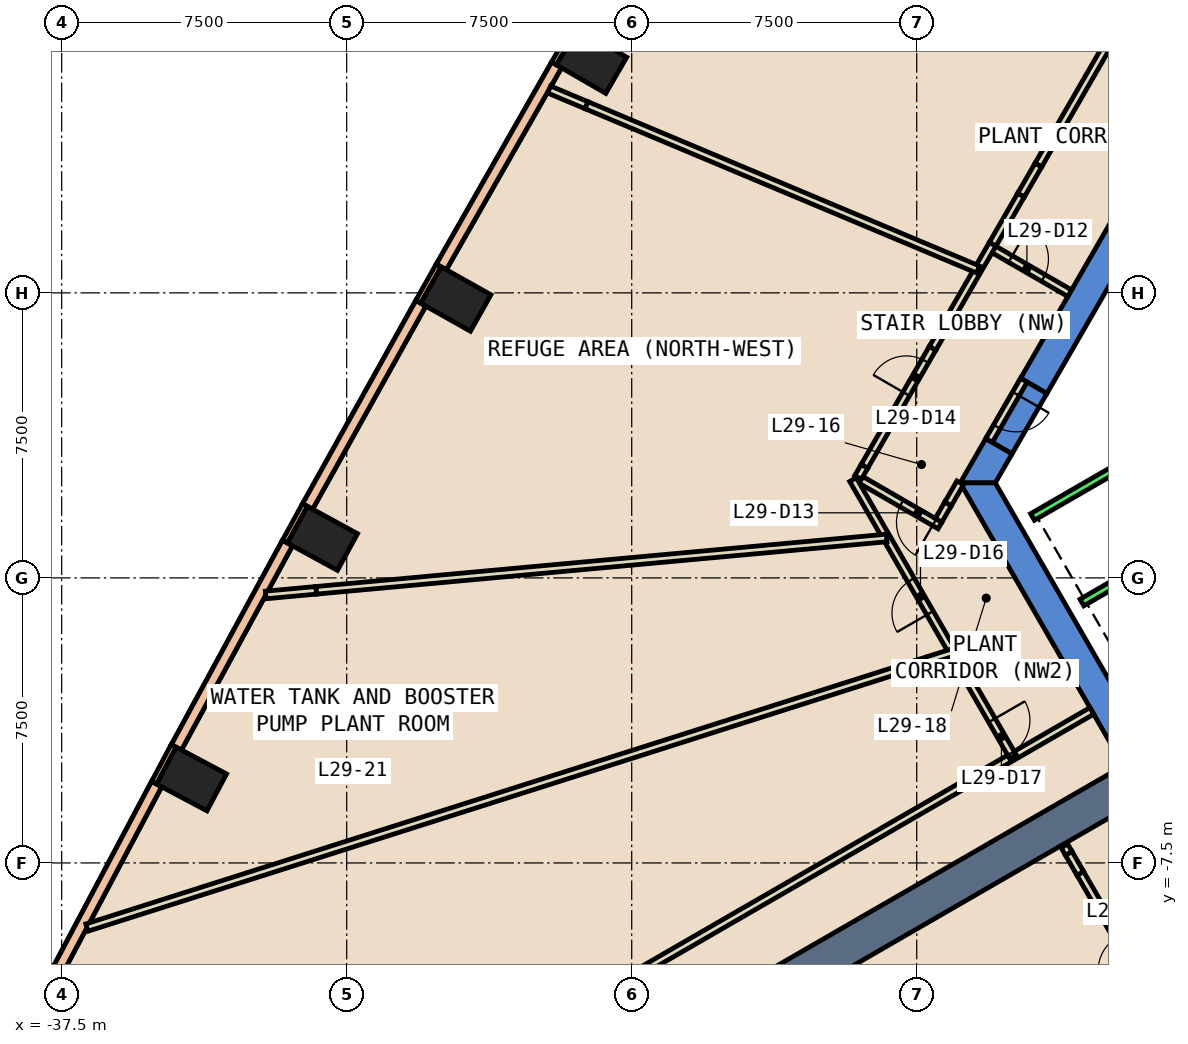
"""IFC4 building model, lengths in metres.
Left out: names, types, materials, properties, quantities, classifications, styles, units other than length and angle.
Written with IfcOpenShell. Run it as: python <this file> out.ifc"""

import sys

from ifc_helpers import new_model, si_unit, direction, frame, frame_2d, origin, origin_2d, place, context, subcontext, project, spatial, polyline, rectangle, outline, extrude, element, fill, save


model = new_model("IFC4")
c1 = context("Model", 3, precision=1e-05, world=origin(), true_north=direction((0.0, 1.0)))
c2 = subcontext(c1, "Body", "Model", "MODEL_VIEW")
j1 = project(units=[si_unit("LENGTHUNIT", "METRE"), si_unit("PLANEANGLEUNIT", "RADIAN")], contexts=[c1])
p1 = place(None, origin())
s1 = spatial("IfcSite", under=j1, at=p1, CompositionType="ELEMENT")
p2 = place(p1, origin())
s2 = spatial("IfcBuilding", under=s1, at=p2, CompositionType="ELEMENT")
p3 = place(p2, frame((0.0, 0.0, 132.8)))
s3 = spatial("IfcBuildingStorey", under=s2, at=p3, CompositionType="ELEMENT", Elevation=132.8)
for number, where, z_axis, x_axis in (
    (1, (-23.556, 13.6, -0.6), (0.0, 0.0, 1.0), (0.5, 0.866, 0.0)),
    (2, (-27.128, 7.338, -0.6), (0.0, 0.0, 1.0), (0.49, 0.872, 0.0)),
    (3, (-30.637, 1.04, -0.6), (0.0, 0.0, 1.0), (0.48, 0.877, 0.0)),
    (4, (-34.081, -5.292, -0.6), (0.0, 0.0, 1.0), (0.469, 0.883, 0.0)),
):
    element("IfcColumn", number, at=place(p3, frame(where, z_axis=z_axis, x_axis=x_axis)), inside=s3, PredefinedType="COLUMN", context=c2, shape_type="SweptSolid", body=[
        extrude(rectangle(XDim=1.1, YDim=1.5, at=origin_2d()), origin(), (0.0, 0.0, 1.0), 5.4),
    ])
p4 = place(p3, frame((0.0, 0.0, -0.6)))
e5 = element("IfcWall", 5, at=p4, inside=s3, PredefinedType="SHEAR", context=c2, shape_type="SweptSolid", body=[
    extrude(outline(polyline([(-12.267, 5.252), (-11.575, 4.852), (-6.466, 13.7), (-6.928, 14.5), (-12.267, 5.252)])), origin(), (0.0, 0.0, 1.0), 5.4),
])
p5 = place(p3, frame((0.0, 0.0, -0.6)))
e6 = element("IfcWall", 6, at=p5, inside=s3, PredefinedType="SHEAR", context=c2, shape_type="SweptSolid", body=[
    extrude(outline(polyline([(-12.49, 3.268), (-13.182, 3.667), (-13.856, 2.5), (-12.933, 2.5), (-12.49, 3.268)])), origin(), (0.0, 0.0, 1.0), 5.4),
])
p6 = place(p3, frame((0.0, 0.0, 3.6)))
e7 = element("IfcWall", 7, at=p6, inside=s3, PredefinedType="SHEAR", context=c2, shape_type="SweptSolid", body=[
    extrude(outline(polyline([(-13.182, 3.667), (-12.49, 3.268), (-11.575, 4.852), (-12.267, 5.252), (-13.182, 3.667)])), origin(), (0.0, 0.0, 1.0), 1.2),
])
p7 = place(p3, frame((0.0, 0.0, -0.6)))
e8 = element("IfcWall", 8, at=p7, inside=s3, PredefinedType="SHEAR", context=c2, shape_type="SweptSolid", body=[
    extrude(outline(polyline([(-13.856, 2.5), (-6.928, -9.5), (-6.466, -8.7), (-12.933, 2.5), (-13.856, 2.5)])), origin(), (0.0, 0.0, 1.0), 5.4),
])
p8 = place(p3, frame((-9.31, -5.375, 0.0), z_axis=(0.0, 0.0, 1.0), x_axis=(-0.86602173752, -0.500006350103, 0.0)))
e9 = element("IfcWall", 9, at=p8, inside=s3, PredefinedType="SHEAR", context=c2, shape_type="SweptSolid", body=[
    extrude(rectangle(XDim=31.463, YDim=1.0, at=frame_2d((15.732, 0.0))), origin(), (0.0, 0.0, 1.0), 4.8),
])
p9 = place(p3, frame((-23.995, 14.489, 0.0), z_axis=(0.0, 0.0, 1.0), x_axis=(-0.499671230855, -0.86621513555, 0.0)))
e10 = element("IfcWall", 10, at=p9, inside=s3, PredefinedType="STANDARD", context=c2, shape_type="SweptSolid", body=[
    extrude(rectangle(XDim=1.1, YDim=0.15, at=frame_2d((0.55, 0.0))), origin(), (0.0, 0.0, 1.0), 4.8),
])
p10 = place(p3, frame((-27.578, 8.222, 0.0), z_axis=(0.0, 0.0, 1.0), x_axis=(-0.490008344094, -0.871717742574, 0.0)))
e11 = element("IfcWall", 11, at=p10, inside=s3, PredefinedType="STANDARD", context=c2, shape_type="SweptSolid", body=[
    extrude(rectangle(XDim=1.1, YDim=0.15, at=frame_2d((0.55, 0.0))), origin(), (0.0, 0.0, 1.0), 4.8),
])
p11 = place(p3, frame((-31.097, 1.919, 0.0), z_axis=(0.0, 0.0, 1.0), x_axis=(-0.479644301902, -0.877463015547, 0.0)))
e12 = element("IfcWall", 12, at=p11, inside=s3, PredefinedType="STANDARD", context=c2, shape_type="SweptSolid", body=[
    extrude(rectangle(XDim=1.101, YDim=0.15, at=frame_2d((0.551, 0.0))), origin(), (0.0, 0.0, 1.0), 4.8),
])
p12 = place(p3, frame((-34.552, -4.42, 0.0), z_axis=(0.0, 0.0, 1.0), x_axis=(-0.469274244365, -0.883052480646, 0.0)))
e13 = element("IfcWall", 13, at=p12, inside=s3, PredefinedType="STANDARD", context=c2, shape_type="SweptSolid", body=[
    extrude(rectangle(XDim=1.1, YDim=0.15, at=frame_2d((0.55, 0.0))), origin(), (0.0, 0.0, 1.0), 4.8),
])
p13 = place(p3, frame((-24.477, 13.498, 0.0), z_axis=(0.0, 0.0, 1.0), x_axis=(-0.495541712582, -0.86858414163, 0.0)))
e14 = element("IfcWall", 14, at=p13, inside=s3, PredefinedType="STANDARD", context=c2, shape_type="SweptSolid", body=[
    extrude(rectangle(XDim=6.121, YDim=0.3, at=frame_2d((3.06, 0.0))), origin(), (0.0, 0.0, 1.0), 1.2),
])
p14 = place(p3, frame((-24.477, 13.498, 4.0), z_axis=(0.0, 0.0, 1.0), x_axis=(-0.495541712582, -0.86858414163, 0.0)))
e15 = element("IfcWall", 15, at=p14, inside=s3, PredefinedType="STANDARD", context=c2, shape_type="SweptSolid", body=[
    extrude(rectangle(XDim=6.121, YDim=0.3, at=frame_2d((3.06, 0.0))), origin(), (0.0, 0.0, 1.0), 0.8),
])
p15 = place(p3, frame((-28.049, 7.226, 0.0), z_axis=(0.0, 0.0, 1.0), x_axis=(-0.486753473685, -0.873539384261, 0.0)))
e16 = element("IfcWall", 16, at=p15, inside=s3, PredefinedType="STANDARD", context=c2, shape_type="SweptSolid", body=[
    extrude(rectangle(XDim=6.12, YDim=0.3, at=frame_2d((3.06, 0.0))), origin(), (0.0, 0.0, 1.0), 1.2),
])
p16 = place(p3, frame((-28.049, 7.226, 4.0), z_axis=(0.0, 0.0, 1.0), x_axis=(-0.486753473685, -0.873539384261, 0.0)))
e17 = element("IfcWall", 17, at=p16, inside=s3, PredefinedType="STANDARD", context=c2, shape_type="SweptSolid", body=[
    extrude(rectangle(XDim=6.12, YDim=0.3, at=frame_2d((3.06, 0.0))), origin(), (0.0, 0.0, 1.0), 0.8),
])
p17 = place(p3, frame((-31.558, 0.918, 0.0), z_axis=(0.0, 0.0, 1.0), x_axis=(-0.477655263247, -0.878547351879, 0.0)))
e18 = element("IfcWall", 18, at=p17, inside=s3, PredefinedType="STANDARD", context=c2, shape_type="SweptSolid", body=[
    extrude(rectangle(XDim=6.119, YDim=0.3, at=frame_2d((3.06, 0.0))), origin(), (0.0, 0.0, 1.0), 1.2),
])
p18 = place(p3, frame((-31.558, 0.918, 4.0), z_axis=(0.0, 0.0, 1.0), x_axis=(-0.477655263247, -0.878547351879, 0.0)))
e19 = element("IfcWall", 19, at=p18, inside=s3, PredefinedType="STANDARD", context=c2, shape_type="SweptSolid", body=[
    extrude(rectangle(XDim=6.119, YDim=0.3, at=frame_2d((3.06, 0.0))), origin(), (0.0, 0.0, 1.0), 0.8),
])
p19 = place(p3, frame((-35.001, -5.425, 0.0), z_axis=(0.0, 0.0, 1.0), x_axis=(-0.468639020107, -0.88338976043, 0.0)))
e20 = element("IfcWall", 20, at=p19, inside=s3, PredefinedType="STANDARD", context=c2, shape_type="SweptSolid", body=[
    extrude(rectangle(XDim=6.329, YDim=0.3, at=frame_2d((3.165, 0.0))), origin(), (0.0, 0.0, 1.0), 1.2),
])
p20 = place(p3, frame((-35.001, -5.425, 4.0), z_axis=(0.0, 0.0, 1.0), x_axis=(-0.468639020107, -0.88338976043, 0.0)))
e21 = element("IfcWall", 21, at=p20, inside=s3, PredefinedType="STANDARD", context=c2, shape_type="SweptSolid", body=[
    extrude(rectangle(XDim=6.329, YDim=0.3, at=frame_2d((3.165, 0.0))), origin(), (0.0, 0.0, 1.0), 0.8),
])
p21 = place(p3, frame((-39.358, -20.223, 0.0), z_axis=(0.0, 0.0, 1.0), x_axis=(0.866032184561, 0.499988255166, 0.0)))
e22 = element("IfcWall", 22, at=p21, inside=s3, PredefinedType="PARTITIONING", context=c2, shape_type="SweptSolid", body=[
    extrude(rectangle(XDim=33.447, YDim=0.2, at=frame_2d((16.723, 0.0))), origin(), (0.0, 0.0, 1.0), 4.8),
])
p22 = place(p3, frame((-13.053, 8.691, 0.0), z_axis=(0.0, 0.0, 1.0), x_axis=(0.865973769406, -0.500089422704, 0.0)))
e23 = element("IfcWall", 23, at=p22, inside=s3, PredefinedType="PARTITIONING", context=c2, shape_type="SweptSolid", body=[
    extrude(rectangle(XDim=2.399, YDim=0.2, at=frame_2d((1.2, 0.0))), origin(), (0.0, 0.0, 1.0), 4.8),
])
p23 = place(p22, frame((0.6, 0.0, 0.0)))
e24 = element("IfcOpeningElement", 24, at=p23, cuts=e23, PredefinedType="OPENING", context=c2, shape_type="SweptSolid", body=[
    extrude(rectangle(XDim=1.0, YDim=2.1, at=frame_2d((0.5, 1.05))), frame((0.0, 0.11, 0.0), z_axis=(0.0, -1.0, 0.0), x_axis=(1.0, 0.0, 0.0)), (0.0, 0.0, 1.0), 0.22),
])
p24 = place(p3, frame((-13.856, 2.501, 0.0), z_axis=(0.0, 0.0, 1.0), x_axis=(-0.500766044352, -0.865582675903, 0.0)))
e25 = element("IfcWall", 25, at=p24, inside=s3, PredefinedType="PARTITIONING", context=c2, shape_type="SweptSolid", body=[
    extrude(rectangle(XDim=0.641, YDim=0.2, at=frame_2d((0.321, 0.0))), origin(), (0.0, 0.0, 1.0), 2.4),
])
p25 = place(p3, frame((-14.388, 1.379, 0.0), z_axis=(0.0, 0.0, 1.0), x_axis=(-0.866022959057, 0.500004234368, 0.0)))
e26 = element("IfcWall", 26, at=p25, inside=s3, PredefinedType="PARTITIONING", context=c2, shape_type="SweptSolid", body=[
    extrude(rectangle(XDim=2.5, YDim=0.2, at=frame_2d((1.25, 0.0))), origin(), (0.0, 0.0, 1.0), 4.8),
])
p26 = place(p25, frame((0.168, 0.0, 0.0)))
e27 = element("IfcOpeningElement", 27, at=p26, cuts=e26, PredefinedType="OPENING", context=c2, shape_type="SweptSolid", body=[
    extrude(rectangle(XDim=1.0, YDim=2.1, at=frame_2d((0.5, 1.05))), frame((0.0, 0.11, 0.0), z_axis=(0.0, -1.0, 0.0), x_axis=(1.0, 0.0, 0.0)), (0.0, 0.0, 1.0), 0.22),
])
p27 = place(p3, frame((-16.543, 2.646, 0.0), z_axis=(0.0, 0.0, 1.0), x_axis=(0.500808028896, 0.865558385202, 0.0)))
e28 = element("IfcWall", 28, at=p27, inside=s3, PredefinedType="PARTITIONING", context=c2, shape_type="SweptSolid", body=[
    extrude(rectangle(XDim=0.337, YDim=0.2, at=frame_2d((0.169, 0.0))), origin(), (0.0, 0.0, 1.0), 2.4),
])
p28 = place(p3, frame((-13.003, 8.778, 0.0), z_axis=(0.0, 0.0, 1.0), x_axis=(0.499929606556, 0.866066041644, 0.0)))
e29 = element("IfcWall", 29, at=p28, inside=s3, PredefinedType="PARTITIONING", context=c2, shape_type="SweptSolid", body=[
    extrude(rectangle(XDim=1.496, YDim=0.2, at=frame_2d((0.748, 0.0))), origin(), (0.0, 0.0, 1.0), 4.8),
])
p29 = place(p3, frame((-14.001, -2.05, 0.0), z_axis=(0.0, 0.0, 1.0), x_axis=(-0.499842197933, 0.866116491683, 0.0)))
e30 = element("IfcWall", 30, at=p29, inside=s3, PredefinedType="PARTITIONING", context=c2, shape_type="SweptSolid", body=[
    extrude(rectangle(XDim=5.354, YDim=0.2, at=frame_2d((2.677, 0.0))), origin(), (0.0, 0.0, 1.0), 4.8),
])
p30 = place(p29, frame((1.301, 0.0, 0.0)))
e31 = element("IfcOpeningElement", 31, at=p30, cuts=e30, PredefinedType="OPENING", context=c2, shape_type="SweptSolid", body=[
    extrude(rectangle(XDim=1.0, YDim=2.1, at=frame_2d((0.5, 1.05))), frame((0.0, 0.11, 0.0), z_axis=(0.0, -1.0, 0.0), x_axis=(1.0, 0.0, 0.0)), (0.0, 0.0, 1.0), 0.22),
])
p31 = place(p3, frame((-14.001, -2.05, 0.0), z_axis=(0.0, 0.0, 1.0), x_axis=(0.500026340207, -0.866010195725, 0.0)))
e32 = element("IfcWall", 32, at=p31, inside=s3, PredefinedType="PARTITIONING", context=c2, shape_type="SweptSolid", body=[
    extrude(rectangle(XDim=3.06, YDim=0.2, at=frame_2d((1.53, 0.0))), origin(), (0.0, 0.0, 1.0), 4.8),
])
p32 = place(p31, frame((1.96, 0.0, 0.0)))
e33 = element("IfcOpeningElement", 33, at=p32, cuts=e32, PredefinedType="OPENING", context=c2, shape_type="SweptSolid", body=[
    extrude(rectangle(XDim=1.0, YDim=2.1, at=frame_2d((0.5, 1.05))), frame((0.0, 0.11, 0.0), z_axis=(0.0, -1.0, 0.0), x_axis=(1.0, 0.0, 0.0)), (0.0, 0.0, 1.0), 0.22),
])
p33 = place(p3, frame((-24.673, 12.85, 0.0), z_axis=(0.0, 0.0, 1.0), x_axis=(0.922202269671, -0.386707866241, 0.0)))
e34 = element("IfcWall", 34, at=p33, inside=s3, PredefinedType="PARTITIONING", context=c2, shape_type="SweptSolid", body=[
    extrude(rectangle(XDim=1.068, YDim=0.2, at=frame_2d((0.534, 0.0))), origin(), (0.0, 0.0, 1.0), 2.4),
])
p34 = place(p3, frame((-15.791, 1.051, 0.0), z_axis=(0.0, 0.0, 1.0), x_axis=(-0.995814925951, -0.091392741793, 0.0)))
e35 = element("IfcWall", 35, at=p34, inside=s3, PredefinedType="PARTITIONING", context=c2, shape_type="SweptSolid", body=[
    extrude(rectangle(XDim=15.077, YDim=0.2, at=frame_2d((7.539, 0.0))), origin(), (0.0, 0.0, 1.0), 4.8),
])
p35 = place(p3, frame((-14.051, -1.963, 0.0), z_axis=(0.0, 0.0, 1.0), x_axis=(-0.953071469252, -0.302745395504, 0.0)))
e36 = element("IfcWall", 36, at=p35, inside=s3, PredefinedType="PARTITIONING", context=c2, shape_type="SweptSolid", body=[
    extrude(rectangle(XDim=23.905, YDim=0.2, at=frame_2d((11.952, 0.0))), origin(), (0.0, 0.0, 1.0), 4.8),
])
p36 = place(p3, frame((-12.181, 5.202, 0.0), z_axis=(0.0, 0.0, 1.0), x_axis=(-0.500215337403, -0.865901042976, 0.0)))
e37 = element("IfcWall", 37, at=p36, inside=s3, PredefinedType="PARTITIONING", context=c2, shape_type="SweptSolid", body=[
    extrude(rectangle(XDim=1.829, YDim=0.2, at=frame_2d((0.915, 0.0))), origin(), (0.0, 0.0, 1.0), 2.4),
])
p37 = place(p36, frame((0.415, 0.0, 0.0)))
e38 = element("IfcOpeningElement", 38, at=p37, cuts=e37, PredefinedType="OPENING", context=c2, shape_type="SweptSolid", body=[
    extrude(rectangle(XDim=1.0, YDim=2.1, at=frame_2d((0.5, 1.05))), frame((0.0, 0.11, 0.0), z_axis=(0.0, -1.0, 0.0), x_axis=(1.0, 0.0, 0.0)), (0.0, 0.0, 1.0), 0.22),
])
p38 = place(p3, frame((-9.002, -10.709, 0.0), z_axis=(0.0, 0.0, 1.0), x_axis=(-0.499654870059, 0.866224572975, 0.0)))
e39 = element("IfcWall", 39, at=p38, inside=s3, PredefinedType="PARTITIONING", context=c2, shape_type="SweptSolid", body=[
    extrude(rectangle(XDim=2.398, YDim=0.2, at=frame_2d((1.199, 0.0))), origin(), (0.0, 0.0, 1.0), 4.8),
])
p39 = place(p38, frame((0.444, 0.0, 0.0)))
e40 = element("IfcOpeningElement", 40, at=p39, cuts=e39, PredefinedType="OPENING", context=c2, shape_type="SweptSolid", body=[
    extrude(rectangle(XDim=1.0, YDim=2.1, at=frame_2d((0.5, 1.05))), frame((0.0, 0.11, 0.0), z_axis=(0.0, -1.0, 0.0), x_axis=(1.0, 0.0, 0.0)), (0.0, 0.0, 1.0), 0.22),
])
p40 = place(p3, frame((-10.2, -8.632, 0.0), z_axis=(0.0, 0.0, 1.0), x_axis=(-0.500482758314, 0.865746503678, 0.0)))
e41 = element("IfcWall", 41, at=p40, inside=s3, PredefinedType="PARTITIONING", context=c2, shape_type="SweptSolid", body=[
    extrude(rectangle(XDim=0.991, YDim=0.2, at=frame_2d((0.496, 0.0))), origin(), (0.0, 0.0, 1.0), 2.3),
])
p41 = place(p3, frame((-10.696, -7.774, 0.0), z_axis=(0.0, 0.0, 1.0), x_axis=(-0.49972245349, 0.866185586049, 0.0)))
e42 = element("IfcWall", 42, at=p41, inside=s3, PredefinedType="PARTITIONING", context=c2, shape_type="SweptSolid", body=[
    extrude(rectangle(XDim=0.608, YDim=0.2, at=frame_2d((0.304, 0.0))), origin(), (0.0, 0.0, 1.0), 4.8),
])
p42 = place(p3, frame((-11.0, -7.247, 0.0), z_axis=(0.0, 0.0, 1.0), x_axis=(-0.499504513693, 0.866311284008, 0.0)))
e43 = element("IfcWall", 43, at=p42, inside=s3, PredefinedType="PARTITIONING", context=c2, shape_type="SweptSolid", body=[
    extrude(rectangle(XDim=0.226, YDim=0.2, at=frame_2d((0.113, 0.0))), origin(), (0.0, 0.0, 1.0), 2.1),
])
p43 = place(p3, frame((-14.177, 1.946, 0.0), z_axis=(0.0, 0.0, 1.0), x_axis=(-0.499736647136, -0.866177397251, 0.0)))
e44 = element("IfcWall", 44, at=p43, inside=s3, PredefinedType="PARTITIONING", context=c2, shape_type="SweptSolid", body=[
    extrude(rectangle(XDim=0.496, YDim=0.2, at=frame_2d((0.248, 0.0))), origin(), (0.0, 0.0, 1.0), 4.8),
])
p44 = place(p3, frame((-16.374, 2.938, 0.0), z_axis=(0.0, 0.0, 1.0), x_axis=(0.49986000933, 0.866106212351, 0.0)))
e45 = element("IfcWall", 45, at=p44, inside=s3, PredefinedType="PARTITIONING", context=c2, shape_type="SweptSolid", body=[
    extrude(rectangle(XDim=3.585, YDim=0.2, at=frame_2d((1.792, 0.0))), origin(), (0.0, 0.0, 1.0), 4.8),
])
p45 = place(p44, frame((2.197, 0.0, 0.0)))
e46 = element("IfcOpeningElement", 46, at=p45, cuts=e45, PredefinedType="OPENING", context=c2, shape_type="SweptSolid", body=[
    extrude(rectangle(XDim=1.0, YDim=2.1, at=frame_2d((0.5, 1.05))), frame((0.0, 0.11, 0.0), z_axis=(0.0, -1.0, 0.0), x_axis=(1.0, 0.0, 0.0)), (0.0, 0.0, 1.0), 0.22),
])
p46 = place(p3, frame((-14.582, 6.043, 0.0), z_axis=(0.0, 0.0, 1.0), x_axis=(0.499693771811, 0.866202132538, 0.0)))
e47 = element("IfcWall", 47, at=p46, inside=s3, PredefinedType="PARTITIONING", context=c2, shape_type="SweptSolid", body=[
    extrude(rectangle(XDim=0.982, YDim=0.2, at=frame_2d((0.491, 0.0))), origin(), (0.0, 0.0, 1.0), 2.4),
])
p47 = place(p3, frame((-14.091, 6.894, 0.0), z_axis=(0.0, 0.0, 1.0), x_axis=(0.500133637508, 0.865948234384, 0.0)))
e48 = element("IfcWall", 48, at=p47, inside=s3, PredefinedType="PARTITIONING", context=c2, shape_type="SweptSolid", body=[
    extrude(rectangle(XDim=2.176, YDim=0.2, at=frame_2d((1.088, 0.0))), origin(), (0.0, 0.0, 1.0), 4.8),
])
p48 = place(p3, frame((-12.255, 10.074, 0.0), z_axis=(0.0, 0.0, 1.0), x_axis=(0.499614570368, 0.866247817357, 0.0)))
e49 = element("IfcWall", 49, at=p48, inside=s3, PredefinedType="PARTITIONING", context=c2, shape_type="SweptSolid", body=[
    extrude(rectangle(XDim=0.914, YDim=0.2, at=frame_2d((0.457, 0.0))), origin(), (0.0, 0.0, 1.0), 2.4),
])
p49 = place(p3, frame((-11.798, 10.866, 0.0), z_axis=(0.0, 0.0, 1.0), x_axis=(0.49997801172, 0.866038098351, 0.0)))
e50 = element("IfcWall", 50, at=p49, inside=s3, PredefinedType="PARTITIONING", context=c2, shape_type="SweptSolid", body=[
    extrude(rectangle(XDim=3.666, YDim=0.2, at=frame_2d((1.833, 0.0))), origin(), (0.0, 0.0, 1.0), 4.8),
])
p50 = place(p3, frame((-23.688, 12.437, 0.0), z_axis=(0.0, 0.0, 1.0), x_axis=(0.922136044786, -0.386865758249, 0.0)))
e51 = element("IfcWall", 51, at=p50, inside=s3, PredefinedType="PARTITIONING", context=c2, shape_type="SweptSolid", body=[
    extrude(rectangle(XDim=11.172, YDim=0.2, at=frame_2d((5.586, 0.0))), origin(), (0.0, 0.0, 1.0), 4.8),
])
p51 = place(p3, frame((-30.805, -0.327, 0.0), z_axis=(0.0, 0.0, 1.0), x_axis=(-0.995790394256, -0.09165964601, 0.0)))
e52 = element("IfcWall", 52, at=p51, inside=s3, PredefinedType="PARTITIONING", context=c2, shape_type="SweptSolid", body=[
    extrude(rectangle(XDim=1.332, YDim=0.2, at=frame_2d((0.666, 0.0))), origin(), (0.0, 0.0, 1.0), 2.4),
])
p52 = place(p3, frame((-9.788, 2.853, 0.0), z_axis=(0.0, 0.0, 1.0), x_axis=(-0.865998541277, -0.500046524342, 0.0)))
e53 = element("IfcWall", 53, at=p52, inside=s3, PredefinedType="STANDARD", context=c2, shape_type="SweptSolid", body=[
    extrude(rectangle(XDim=2.5, YDim=0.2, at=frame_2d((1.25, 0.0))), origin(), (0.0, 0.0, 1.0), 4.8),
])
p53 = place(p3, frame((-8.488, 0.602, 0.0), z_axis=(0.0, 0.0, 1.0), x_axis=(-0.866022959057, -0.500004234368, 0.0)))
e54 = element("IfcWall", 54, at=p53, inside=s3, PredefinedType="STANDARD", context=c2, shape_type="SweptSolid", body=[
    extrude(rectangle(XDim=2.5, YDim=0.2, at=frame_2d((1.25, 0.0))), origin(), (0.0, 0.0, 1.0), 4.8),
])
p54 = place(p23, origin())
e55 = element("IfcDoor", 55, at=p54, inside=s3, OperationType="SINGLE_SWING_RIGHT", PredefinedType="DOOR", context=c2, shape_type="SweptSolid", body=[
    extrude(rectangle(XDim=1.0, YDim=2.1, at=frame_2d((0.5, 1.05))), frame((0.0, 0.025, 0.0), z_axis=(0.0, -1.0, 0.0), x_axis=(1.0, 0.0, 0.0)), (0.0, 0.0, 1.0), 0.05),
])
fill(e24, e55)
p55 = place(p26, origin())
e56 = element("IfcDoor", 56, at=p55, inside=s3, OperationType="SINGLE_SWING_LEFT", PredefinedType="DOOR", context=c2, shape_type="SweptSolid", body=[
    extrude(rectangle(XDim=1.0, YDim=2.1, at=frame_2d((0.5, 1.05))), frame((0.0, 0.025, 0.0), z_axis=(0.0, -1.0, 0.0), x_axis=(1.0, 0.0, 0.0)), (0.0, 0.0, 1.0), 0.05),
])
fill(e27, e56)
p56 = place(p45, origin())
e57 = element("IfcDoor", 57, at=p56, inside=s3, OperationType="SINGLE_SWING_RIGHT", PredefinedType="DOOR", context=c2, shape_type="SweptSolid", body=[
    extrude(rectangle(XDim=1.0, YDim=2.1, at=frame_2d((0.5, 1.05))), frame((0.0, 0.025, 0.0), z_axis=(0.0, -1.0, 0.0), x_axis=(1.0, 0.0, 0.0)), (0.0, 0.0, 1.0), 0.05),
])
fill(e46, e57)
p57 = place(p30, origin())
e58 = element("IfcDoor", 58, at=p57, inside=s3, OperationType="SINGLE_SWING_RIGHT", PredefinedType="DOOR", context=c2, shape_type="SweptSolid", body=[
    extrude(rectangle(XDim=1.0, YDim=2.1, at=frame_2d((0.5, 1.05))), frame((0.0, 0.025, 0.0), z_axis=(0.0, -1.0, 0.0), x_axis=(1.0, 0.0, 0.0)), (0.0, 0.0, 1.0), 0.05),
])
fill(e31, e58)
p58 = place(p32, origin())
e59 = element("IfcDoor", 59, at=p58, inside=s3, OperationType="SINGLE_SWING_LEFT", PredefinedType="DOOR", context=c2, shape_type="SweptSolid", body=[
    extrude(rectangle(XDim=1.0, YDim=2.1, at=frame_2d((0.5, 1.05))), frame((0.0, 0.025, 0.0), z_axis=(0.0, -1.0, 0.0), x_axis=(1.0, 0.0, 0.0)), (0.0, 0.0, 1.0), 0.05),
])
fill(e33, e59)
p59 = place(p37, origin())
e60 = element("IfcDoor", 60, at=p59, inside=s3, OperationType="SINGLE_SWING_LEFT", PredefinedType="DOOR", context=c2, shape_type="SweptSolid", body=[
    extrude(rectangle(XDim=1.0, YDim=2.1, at=frame_2d((0.5, 1.05))), frame((0.0, 0.025, 0.0), z_axis=(0.0, -1.0, 0.0), x_axis=(1.0, 0.0, 0.0)), (0.0, 0.0, 1.0), 0.05),
])
fill(e38, e60)
save(model, sys.argv[1])
